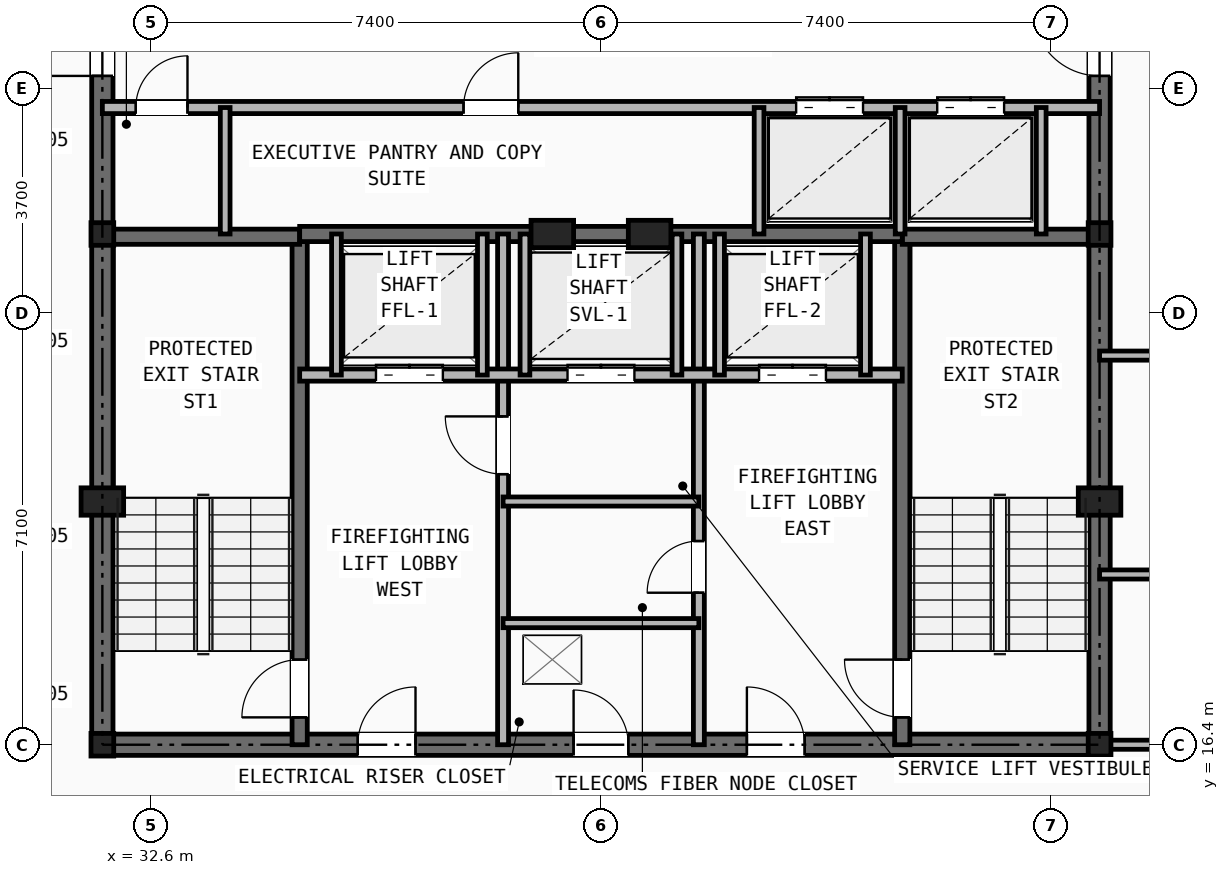
"""IFC4 building model, lengths in metres.
Left out: names, types, materials, properties, quantities, classifications, styles, units other than length and angle.
Written with IfcOpenShell. Run it as: python <this file> out.ifc"""

import sys

from ifc_helpers import new_model, si_unit, direction, frame, frame_2d, origin, origin_2d, place, context, subcontext, project, spatial, rectangle, i_section, extrude, element, fill, save


model = new_model("IFC4")
c1 = context("Model", 3, precision=1e-05, world=origin(), true_north=direction((0.0, 1.0)))
c2 = subcontext(c1, "Body", "Model", "MODEL_VIEW")
j1 = project(units=[si_unit("LENGTHUNIT", "METRE"), si_unit("PLANEANGLEUNIT", "RADIAN")], contexts=[c1])
p1 = place(None, origin())
s1 = spatial("IfcSite", under=j1, at=p1, CompositionType="ELEMENT")
p2 = place(p1, origin())
s2 = spatial("IfcBuilding", under=s1, at=p2, CompositionType="ELEMENT")
p3 = place(p2, frame((0.0, 0.0, 255.0)))
s3 = spatial("IfcBuildingStorey", under=s2, at=p3, CompositionType="ELEMENT", Elevation=255.0)
for number, where, z_axis, x_axis in (
    (1, (31.8, 16.4, 0.0), (0.0, 0.0, 1.0), (1.0, 0.0, 0.0)),
    (2, (48.2, 16.4, 0.0), (0.0, 0.0, 1.0), (1.0, 0.0, 0.0)),
    (3, (31.8, 24.8, 0.0), (0.0, 0.0, 1.0), (1.0, 0.0, 0.0)),
    (4, (48.2, 24.8, 0.0), (0.0, 0.0, 1.0), (1.0, 0.0, 0.0)),
):
    element("IfcColumn", number, at=place(p3, frame(where, z_axis=z_axis, x_axis=x_axis)), inside=s3, PredefinedType="COLUMN", context=c2, shape_type="SweptSolid", body=[
        extrude(i_section(OverallWidth=0.374, OverallDepth=0.372, WebThickness=0.016, FlangeThickness=0.026, at=origin_2d()), origin(), (0.0, 0.0, 1.0), 3.5),
    ])
for number, where, z_axis, x_axis in (
    (5, (31.8, 20.4, 0.0), (0.0, 0.0, 1.0), (1.0, 0.0, 0.0)),
    (6, (48.2, 20.4, 0.0), (0.0, 0.0, 1.0), (1.0, 0.0, 0.0)),
    (7, (39.2, 24.8, 0.0), (0.0, 0.0, 1.0), (1.0, 0.0, 0.0)),
    (8, (40.8, 24.8, 0.0), (0.0, 0.0, 1.0), (1.0, 0.0, 0.0)),
):
    element("IfcColumn", number, at=place(p3, frame(where, z_axis=z_axis, x_axis=x_axis)), inside=s3, PredefinedType="PILASTER", context=c2, shape_type="SweptSolid", body=[
        extrude(rectangle(XDim=0.7, YDim=0.45, at=origin_2d()), origin(), (0.0, 0.0, 1.0), 3.5),
    ])
p4 = place(p3, frame((31.8, 16.4, 0.0), z_axis=(0.0, 0.0, 1.0), x_axis=(1.0, 0.0, 0.0)))
e9 = element("IfcWall", 9, at=p4, inside=s3, PredefinedType="SHEAR", context=c2, shape_type="SweptSolid", body=[
    extrude(rectangle(XDim=16.4, YDim=0.35, at=frame_2d((8.2, 0.0))), origin(), (0.0, 0.0, 1.0), 3.25),
])
p5 = place(p4, frame((7.75, 0.0, 0.0)))
e10 = element("IfcOpeningElement", 10, at=p5, cuts=e9, PredefinedType="OPENING", context=c2, shape_type="SweptSolid", body=[
    extrude(rectangle(XDim=0.9, YDim=2.1, at=frame_2d((0.45, 1.05))), frame((0.0, 0.185, 0.0), z_axis=(0.0, -1.0, 0.0), x_axis=(1.0, 0.0, 0.0)), (0.0, 0.0, 1.0), 0.37),
])
p6 = place(p4, frame((4.2, 0.0, 0.0)))
e11 = element("IfcOpeningElement", 11, at=p6, cuts=e9, PredefinedType="OPENING", context=c2, shape_type="SweptSolid", body=[
    extrude(rectangle(XDim=0.95, YDim=2.1, at=frame_2d((0.475, 1.05))), frame((0.0, 0.185, 0.0), z_axis=(0.0, -1.0, 0.0), x_axis=(1.0, 0.0, 0.0)), (0.0, 0.0, 1.0), 0.37),
])
p7 = place(p4, frame((10.6, 0.0, 0.0)))
e12 = element("IfcOpeningElement", 12, at=p7, cuts=e9, PredefinedType="OPENING", context=c2, shape_type="SweptSolid", body=[
    extrude(rectangle(XDim=0.95, YDim=2.1, at=frame_2d((0.475, 1.05))), frame((0.0, 0.185, 0.0), z_axis=(0.0, -1.0, 0.0), x_axis=(1.0, 0.0, 0.0)), (0.0, 0.0, 1.0), 0.37),
])
p8 = place(p3, frame((31.8, 16.4, 0.0), z_axis=(0.0, 0.0, 1.0), x_axis=(0.0, 1.0, 0.0)))
e13 = element("IfcWall", 13, at=p8, inside=s3, PredefinedType="SHEAR", context=c2, shape_type="SweptSolid", body=[
    extrude(rectangle(XDim=14.8, YDim=0.35, at=frame_2d((7.4, 0.0))), origin(), (0.0, 0.0, 1.0), 3.25),
])
p9 = place(p8, frame((11.0, 0.0, 0.0)))
e14 = element("IfcOpeningElement", 14, at=p9, cuts=e13, PredefinedType="OPENING", context=c2, shape_type="SweptSolid", body=[
    extrude(rectangle(XDim=1.1, YDim=2.15, at=frame_2d((0.55, 1.075))), frame((0.0, 0.185, 0.0), z_axis=(0.0, -1.0, 0.0), x_axis=(1.0, 0.0, 0.0)), (0.0, 0.0, 1.0), 0.37),
])
p10 = place(p3, frame((48.2, 16.4, 0.0), z_axis=(0.0, 0.0, 1.0), x_axis=(0.0, 1.0, 0.0)))
e15 = element("IfcWall", 15, at=p10, inside=s3, PredefinedType="SHEAR", context=c2, shape_type="SweptSolid", body=[
    extrude(rectangle(XDim=14.8, YDim=0.35, at=frame_2d((7.4, 0.0))), origin(), (0.0, 0.0, 1.0), 3.25),
])
p11 = place(p10, frame((11.0, 0.0, 0.0)))
e16 = element("IfcOpeningElement", 16, at=p11, cuts=e15, PredefinedType="OPENING", context=c2, shape_type="SweptSolid", body=[
    extrude(rectangle(XDim=1.1, YDim=2.15, at=frame_2d((0.55, 1.075))), frame((0.0, 0.185, 0.0), z_axis=(0.0, -1.0, 0.0), x_axis=(1.0, 0.0, 0.0)), (0.0, 0.0, 1.0), 0.37),
])
p12 = place(p3, frame((35.045, 16.4, 0.0), z_axis=(0.0, 0.0, 1.0), x_axis=(0.0, 1.0, 0.0)))
e17 = element("IfcWall", 17, at=p12, inside=s3, PredefinedType="SHEAR", context=c2, shape_type="SweptSolid", body=[
    extrude(rectangle(XDim=8.4, YDim=0.25, at=frame_2d((4.2, 0.0))), origin(), (0.0, 0.0, 1.0), 3.25),
])
p13 = place(p12, frame((0.45, 0.0, 0.0)))
e18 = element("IfcOpeningElement", 18, at=p13, cuts=e17, PredefinedType="OPENING", context=c2, shape_type="SweptSolid", body=[
    extrude(rectangle(XDim=0.95, YDim=2.1, at=frame_2d((0.475, 1.05))), frame((0.0, 0.135, 0.0), z_axis=(0.0, -1.0, 0.0), x_axis=(1.0, 0.0, 0.0)), (0.0, 0.0, 1.0), 0.27),
])
p14 = place(p3, frame((31.8, 24.755, 0.0), z_axis=(0.0, 0.0, 1.0), x_axis=(1.0, 0.0, 0.0)))
e19 = element("IfcWall", 19, at=p14, inside=s3, PredefinedType="SHEAR", context=c2, shape_type="SweptSolid", body=[
    extrude(rectangle(XDim=3.245, YDim=0.25, at=frame_2d((1.623, 0.0))), origin(), (0.0, 0.0, 1.0), 3.25),
])
p15 = place(p3, frame((44.955, 16.4, 0.0), z_axis=(0.0, 0.0, 1.0), x_axis=(0.0, 1.0, 0.0)))
e20 = element("IfcWall", 20, at=p15, inside=s3, PredefinedType="SHEAR", context=c2, shape_type="SweptSolid", body=[
    extrude(rectangle(XDim=8.4, YDim=0.25, at=frame_2d((4.2, 0.0))), origin(), (0.0, 0.0, 1.0), 3.25),
])
p16 = place(p15, frame((0.45, 0.0, 0.0)))
e21 = element("IfcOpeningElement", 21, at=p16, cuts=e20, PredefinedType="OPENING", context=c2, shape_type="SweptSolid", body=[
    extrude(rectangle(XDim=0.95, YDim=2.1, at=frame_2d((0.475, 1.05))), frame((0.0, 0.135, 0.0), z_axis=(0.0, -1.0, 0.0), x_axis=(1.0, 0.0, 0.0)), (0.0, 0.0, 1.0), 0.27),
])
p17 = place(p3, frame((44.955, 24.755, 0.0), z_axis=(0.0, 0.0, 1.0), x_axis=(1.0, 0.0, 0.0)))
e22 = element("IfcWall", 22, at=p17, inside=s3, PredefinedType="SHEAR", context=c2, shape_type="SweptSolid", body=[
    extrude(rectangle(XDim=3.245, YDim=0.25, at=frame_2d((1.623, 0.0))), origin(), (0.0, 0.0, 1.0), 3.25),
])
p18 = place(p3, frame((35.045, 24.8, 0.0), z_axis=(0.0, 0.0, 1.0), x_axis=(1.0, 0.0, 0.0)))
e23 = element("IfcWall", 23, at=p18, inside=s3, PredefinedType="SHEAR", context=c2, shape_type="SweptSolid", body=[
    extrude(rectangle(XDim=9.91, YDim=0.25, at=frame_2d((4.955, 0.0))), origin(), (0.0, 0.0, 1.0), 3.25),
])
p19 = place(p3, frame((38.39, 16.4, 0.0), z_axis=(0.0, 0.0, 1.0), x_axis=(0.0, 1.0, 0.0)))
e24 = element("IfcWall", 24, at=p19, inside=s3, PredefinedType="PARTITIONING", context=c2, shape_type="SweptSolid", body=[
    extrude(rectangle(XDim=8.4, YDim=0.18, at=frame_2d((4.2, 0.0))), origin(), (0.0, 0.0, 1.0), 2.705),
])
p20 = place(p19, frame((4.45, 0.0, 0.0)))
e25 = element("IfcOpeningElement", 25, at=p20, cuts=e24, PredefinedType="OPENING", context=c2, shape_type="SweptSolid", body=[
    extrude(rectangle(XDim=0.95, YDim=2.1, at=frame_2d((0.475, 1.05))), frame((0.0, 0.1, 0.0), z_axis=(0.0, -1.0, 0.0), x_axis=(1.0, 0.0, 0.0)), (0.0, 0.0, 1.0), 0.2),
])
p21 = place(p3, frame((41.61, 16.4, 0.0), z_axis=(0.0, 0.0, 1.0), x_axis=(0.0, 1.0, 0.0)))
e26 = element("IfcWall", 26, at=p21, inside=s3, PredefinedType="PARTITIONING", context=c2, shape_type="SweptSolid", body=[
    extrude(rectangle(XDim=8.4, YDim=0.18, at=frame_2d((4.2, 0.0))), origin(), (0.0, 0.0, 1.0), 2.705),
])
p22 = place(p21, frame((2.5, 0.0, 0.0)))
e27 = element("IfcOpeningElement", 27, at=p22, cuts=e26, PredefinedType="OPENING", context=c2, shape_type="SweptSolid", body=[
    extrude(rectangle(XDim=0.85, YDim=2.05, at=frame_2d((0.425, 1.025))), frame((0.0, 0.1, 0.0), z_axis=(0.0, -1.0, 0.0), x_axis=(1.0, 0.0, 0.0)), (0.0, 0.0, 1.0), 0.2),
])
p23 = place(p3, frame((35.045, 22.48, 0.0), z_axis=(0.0, 0.0, 1.0), x_axis=(1.0, 0.0, 0.0)))
e28 = element("IfcWall", 28, at=p23, inside=s3, PredefinedType="SOLIDWALL", context=c2, shape_type="SweptSolid", body=[
    extrude(rectangle(XDim=9.91, YDim=0.2, at=frame_2d((4.955, 0.0))), origin(), (0.0, 0.0, 1.0), 3.25),
])
p24 = place(p23, frame((1.255, 0.0, 0.0)))
e29 = element("IfcOpeningElement", 29, at=p24, cuts=e28, PredefinedType="OPENING", context=c2, shape_type="SweptSolid", body=[
    extrude(rectangle(XDim=1.1, YDim=2.15, at=frame_2d((0.55, 1.075))), frame((0.0, 0.11, 0.0), z_axis=(0.0, -1.0, 0.0), x_axis=(1.0, 0.0, 0.0)), (0.0, 0.0, 1.0), 0.22),
])
p25 = place(p23, frame((7.555, 0.0, 0.0)))
e30 = element("IfcOpeningElement", 30, at=p25, cuts=e28, PredefinedType="OPENING", context=c2, shape_type="SweptSolid", body=[
    extrude(rectangle(XDim=1.1, YDim=2.15, at=frame_2d((0.55, 1.075))), frame((0.0, 0.11, 0.0), z_axis=(0.0, -1.0, 0.0), x_axis=(1.0, 0.0, 0.0)), (0.0, 0.0, 1.0), 0.22),
])
p26 = place(p23, frame((4.405, 0.0, 0.0)))
e31 = element("IfcOpeningElement", 31, at=p26, cuts=e28, PredefinedType="OPENING", context=c2, shape_type="SweptSolid", body=[
    extrude(rectangle(XDim=1.1, YDim=2.15, at=frame_2d((0.55, 1.075))), frame((0.0, 0.11, 0.0), z_axis=(0.0, -1.0, 0.0), x_axis=(1.0, 0.0, 0.0)), (0.0, 0.0, 1.0), 0.22),
])
for number, where, z_axis, x_axis in (
    (32, (38.39, 18.4, 0.0), (0.0, 0.0, 1.0), (1.0, 0.0, 0.0)),
    (33, (38.39, 20.4, 0.0), (0.0, 0.0, 1.0), (1.0, 0.0, 0.0)),
):
    element("IfcWall", number, at=place(p3, frame(where, z_axis=z_axis, x_axis=x_axis)), inside=s3, PredefinedType="PARTITIONING", context=c2, shape_type="SweptSolid", body=[
        extrude(rectangle(XDim=3.22, YDim=0.15, at=frame_2d((1.61, 0.0))), origin(), (0.0, 0.0, 1.0), 3.25),
    ])
for number, where, z_axis, x_axis in (
    (34, (35.65, 22.48, 0.0), (0.0, 0.0, 1.0), (0.0, 1.0, 0.0)),
    (35, (38.05, 22.48, 0.0), (0.0, 0.0, 1.0), (0.0, 1.0, 0.0)),
    (36, (41.95, 22.48, 0.0), (0.0, 0.0, 1.0), (0.0, 1.0, 0.0)),
    (37, (44.35, 22.48, 0.0), (0.0, 0.0, 1.0), (0.0, 1.0, 0.0)),
    (38, (38.75, 22.48, 0.0), (0.0, 0.0, 1.0), (0.0, 1.0, 0.0)),
    (39, (41.25, 22.48, 0.0), (0.0, 0.0, 1.0), (0.0, 1.0, 0.0)),
):
    element("IfcWall", number, at=place(p3, frame(where, z_axis=z_axis, x_axis=x_axis)), inside=s3, PredefinedType="SOLIDWALL", context=c2, shape_type="SweptSolid", body=[
        extrude(rectangle(XDim=2.32, YDim=0.16, at=frame_2d((1.16, 0.0))), origin(), (0.0, 0.0, 1.0), 3.25),
    ])
p27 = place(p3, frame((31.8, 26.88, 0.0), z_axis=(0.0, 0.0, 1.0), x_axis=(1.0, 0.0, 0.0)))
e40 = element("IfcWall", 40, at=p27, inside=s3, PredefinedType="SOLIDWALL", context=c2, shape_type="SweptSolid", body=[
    extrude(rectangle(XDim=16.4, YDim=0.2, at=frame_2d((8.2, 0.0))), origin(), (0.0, 0.0, 1.0), 2.705),
])
p28 = place(p27, frame((0.55, 0.0, 0.0)))
e41 = element("IfcOpeningElement", 41, at=p28, cuts=e40, PredefinedType="OPENING", context=c2, shape_type="SweptSolid", body=[
    extrude(rectangle(XDim=0.85, YDim=2.05, at=frame_2d((0.425, 1.025))), frame((0.0, 0.11, 0.0), z_axis=(0.0, -1.0, 0.0), x_axis=(1.0, 0.0, 0.0)), (0.0, 0.0, 1.0), 0.22),
])
p29 = place(p27, frame((5.94, 0.0, 0.0)))
e42 = element("IfcOpeningElement", 42, at=p29, cuts=e40, PredefinedType="OPENING", context=c2, shape_type="SweptSolid", body=[
    extrude(rectangle(XDim=0.9, YDim=2.1, at=frame_2d((0.45, 1.05))), frame((0.0, 0.11, 0.0), z_axis=(0.0, -1.0, 0.0), x_axis=(1.0, 0.0, 0.0)), (0.0, 0.0, 1.0), 0.22),
])
p30 = place(p27, frame((11.41, 0.0, 0.0)))
e43 = element("IfcOpeningElement", 43, at=p30, cuts=e40, PredefinedType="OPENING", context=c2, shape_type="SweptSolid", body=[
    extrude(rectangle(XDim=1.1, YDim=2.15, at=frame_2d((0.55, 1.075))), frame((0.0, 0.11, 0.0), z_axis=(0.0, -1.0, 0.0), x_axis=(1.0, 0.0, 0.0)), (0.0, 0.0, 1.0), 0.22),
])
p31 = place(p27, frame((13.73, 0.0, 0.0)))
e44 = element("IfcOpeningElement", 44, at=p31, cuts=e40, PredefinedType="OPENING", context=c2, shape_type="SweptSolid", body=[
    extrude(rectangle(XDim=1.1, YDim=2.15, at=frame_2d((0.55, 1.075))), frame((0.0, 0.11, 0.0), z_axis=(0.0, -1.0, 0.0), x_axis=(1.0, 0.0, 0.0)), (0.0, 0.0, 1.0), 0.22),
])
for number, where, z_axis, x_axis in (
    (45, (33.82, 24.8, 0.0), (0.0, 0.0, 1.0), (0.0, 1.0, 0.0)),
    (46, (42.6, 24.8, 0.0), (0.0, 0.0, 1.0), (0.0, 1.0, 0.0)),
    (47, (44.92, 24.8, 0.0), (0.0, 0.0, 1.0), (0.0, 1.0, 0.0)),
    (48, (47.24, 24.8, 0.0), (0.0, 0.0, 1.0), (0.0, 1.0, 0.0)),
):
    element("IfcWall", number, at=place(p3, frame(where, z_axis=z_axis, x_axis=x_axis)), inside=s3, PredefinedType="SOLIDWALL", context=c2, shape_type="SweptSolid", body=[
        extrude(rectangle(XDim=2.08, YDim=0.16, at=frame_2d((1.04, 0.0))), origin(), (0.0, 0.0, 1.0), 3.25),
    ])
p32 = place(p3, frame((48.2, 16.4, 0.0), z_axis=(0.0, 0.0, 1.0), x_axis=(1.0, 0.0, 0.0)))
e49 = element("IfcWall", 49, at=p32, inside=s3, PredefinedType="PARTITIONING", context=c2, shape_type="SweptSolid", body=[
    extrude(rectangle(XDim=15.289, YDim=0.15, at=frame_2d((7.644, 0.0))), origin(), (0.0, 0.0, 1.0), 2.292),
])
p33 = place(p3, frame((48.2, 19.2, 0.0), z_axis=(0.0, 0.0, 1.0), x_axis=(1.0, 0.0, 0.0)))
e50 = element("IfcWall", 50, at=p33, inside=s3, PredefinedType="PARTITIONING", context=c2, shape_type="SweptSolid", body=[
    extrude(rectangle(XDim=13.268, YDim=0.15, at=frame_2d((6.634, 0.0))), origin(), (0.0, 0.0, 1.0), 2.292),
])
p34 = place(p33, frame((1.4, 0.0, 0.0)))
e51 = element("IfcOpeningElement", 51, at=p34, cuts=e50, PredefinedType="OPENING", context=c2, shape_type="SweptSolid", body=[
    extrude(rectangle(XDim=0.95, YDim=2.1, at=frame_2d((0.475, 1.05))), frame((0.0, 0.085, 0.0), z_axis=(0.0, -1.0, 0.0), x_axis=(1.0, 0.0, 0.0)), (0.0, 0.0, 1.0), 0.17),
])
p35 = place(p3, frame((48.2, 22.8, 0.0), z_axis=(0.0, 0.0, 1.0), x_axis=(1.0, 0.0, 0.0)))
e52 = element("IfcWall", 52, at=p35, inside=s3, PredefinedType="PARTITIONING", context=c2, shape_type="SweptSolid", body=[
    extrude(rectangle(XDim=10.67, YDim=0.15, at=frame_2d((5.335, 0.0))), origin(), (0.0, 0.0, 1.0), 2.628),
])
p36 = place(p35, frame((1.4, 0.0, 0.0)))
e53 = element("IfcOpeningElement", 53, at=p36, cuts=e52, PredefinedType="OPENING", context=c2, shape_type="SweptSolid", body=[
    extrude(rectangle(XDim=0.95, YDim=2.1, at=frame_2d((0.475, 1.05))), frame((0.0, 0.085, 0.0), z_axis=(0.0, -1.0, 0.0), x_axis=(1.0, 0.0, 0.0)), (0.0, 0.0, 1.0), 0.17),
])
p37 = place(p5, origin())
e54 = element("IfcDoor", 54, at=p37, inside=s3, OperationType="SINGLE_SWING_LEFT", PredefinedType="DOOR", context=c2, shape_type="SweptSolid", body=[
    extrude(rectangle(XDim=0.9, YDim=2.1, at=frame_2d((0.45, 1.05))), frame((0.0, 0.025, 0.0), z_axis=(0.0, -1.0, 0.0), x_axis=(1.0, 0.0, 0.0)), (0.0, 0.0, 1.0), 0.05),
])
fill(e10, e54)
p38 = place(p22, origin())
e55 = element("IfcDoor", 55, at=p38, inside=s3, OperationType="SINGLE_SWING_LEFT", PredefinedType="DOOR", context=c2, shape_type="SweptSolid", body=[
    extrude(rectangle(XDim=0.85, YDim=2.05, at=frame_2d((0.425, 1.025))), frame((0.0, 0.025, 0.0), z_axis=(0.0, -1.0, 0.0), x_axis=(1.0, 0.0, 0.0)), (0.0, 0.0, 1.0), 0.05),
])
fill(e27, e55)
p39 = place(p20, origin())
e56 = element("IfcDoor", 56, at=p39, inside=s3, OperationType="SINGLE_SWING_RIGHT", PredefinedType="DOOR", context=c2, shape_type="SweptSolid", body=[
    extrude(rectangle(XDim=0.95, YDim=2.1, at=frame_2d((0.475, 1.05))), frame((0.0, 0.025, 0.0), z_axis=(0.0, -1.0, 0.0), x_axis=(1.0, 0.0, 0.0)), (0.0, 0.0, 1.0), 0.05),
])
fill(e25, e56)
p40 = place(p13, origin())
e57 = element("IfcDoor", 57, at=p40, inside=s3, OperationType="SINGLE_SWING_LEFT", PredefinedType="DOOR", context=c2, shape_type="SweptSolid", body=[
    extrude(rectangle(XDim=0.95, YDim=2.1, at=frame_2d((0.475, 1.05))), frame((0.0, 0.025, 0.0), z_axis=(0.0, -1.0, 0.0), x_axis=(1.0, 0.0, 0.0)), (0.0, 0.0, 1.0), 0.05),
])
fill(e18, e57)
p41 = place(p16, origin())
e58 = element("IfcDoor", 58, at=p41, inside=s3, OperationType="SINGLE_SWING_RIGHT", PredefinedType="DOOR", context=c2, shape_type="SweptSolid", body=[
    extrude(rectangle(XDim=0.95, YDim=2.1, at=frame_2d((0.475, 1.05))), frame((0.0, 0.025, 0.0), z_axis=(0.0, -1.0, 0.0), x_axis=(1.0, 0.0, 0.0)), (0.0, 0.0, 1.0), 0.05),
])
fill(e21, e58)
p42 = place(p6, origin())
e59 = element("IfcDoor", 59, at=p42, inside=s3, OperationType="SINGLE_SWING_RIGHT", PredefinedType="DOOR", context=c2, shape_type="SweptSolid", body=[
    extrude(rectangle(XDim=0.95, YDim=2.1, at=frame_2d((0.475, 1.05))), frame((0.0, 0.025, 0.0), z_axis=(0.0, -1.0, 0.0), x_axis=(1.0, 0.0, 0.0)), (0.0, 0.0, 1.0), 0.05),
])
fill(e11, e59)
p43 = place(p7, origin())
e60 = element("IfcDoor", 60, at=p43, inside=s3, OperationType="SINGLE_SWING_LEFT", PredefinedType="DOOR", context=c2, shape_type="SweptSolid", body=[
    extrude(rectangle(XDim=0.95, YDim=2.1, at=frame_2d((0.475, 1.05))), frame((0.0, 0.025, 0.0), z_axis=(0.0, -1.0, 0.0), x_axis=(1.0, 0.0, 0.0)), (0.0, 0.0, 1.0), 0.05),
])
fill(e12, e60)
p44 = place(p24, origin())
e61 = element("IfcDoor", 61, at=p44, inside=s3, OperationType="DOUBLE_DOOR_SLIDING", PredefinedType="DOOR", context=c2, shape_type="SweptSolid", body=[
    extrude(rectangle(XDim=1.1, YDim=2.15, at=frame_2d((0.55, 1.075))), frame((0.0, 0.025, 0.0), z_axis=(0.0, -1.0, 0.0), x_axis=(1.0, 0.0, 0.0)), (0.0, 0.0, 1.0), 0.05),
])
fill(e29, e61)
p45 = place(p25, origin())
e62 = element("IfcDoor", 62, at=p45, inside=s3, OperationType="DOUBLE_DOOR_SLIDING", PredefinedType="DOOR", context=c2, shape_type="SweptSolid", body=[
    extrude(rectangle(XDim=1.1, YDim=2.15, at=frame_2d((0.55, 1.075))), frame((0.0, 0.025, 0.0), z_axis=(0.0, -1.0, 0.0), x_axis=(1.0, 0.0, 0.0)), (0.0, 0.0, 1.0), 0.05),
])
fill(e30, e62)
p46 = place(p26, origin())
e63 = element("IfcDoor", 63, at=p46, inside=s3, OperationType="DOUBLE_DOOR_SLIDING", PredefinedType="DOOR", context=c2, shape_type="SweptSolid", body=[
    extrude(rectangle(XDim=1.1, YDim=2.15, at=frame_2d((0.55, 1.075))), frame((0.0, 0.025, 0.0), z_axis=(0.0, -1.0, 0.0), x_axis=(1.0, 0.0, 0.0)), (0.0, 0.0, 1.0), 0.05),
])
fill(e31, e63)
p47 = place(p28, origin())
e64 = element("IfcDoor", 64, at=p47, inside=s3, OperationType="SINGLE_SWING_RIGHT", PredefinedType="DOOR", context=c2, shape_type="SweptSolid", body=[
    extrude(rectangle(XDim=0.85, YDim=2.05, at=frame_2d((0.425, 1.025))), frame((0.0, 0.025, 0.0), z_axis=(0.0, -1.0, 0.0), x_axis=(1.0, 0.0, 0.0)), (0.0, 0.0, 1.0), 0.05),
])
fill(e41, e64)
p48 = place(p9, origin())
e65 = element("IfcDoor", 65, at=p48, inside=s3, OperationType="SINGLE_SWING_LEFT", PredefinedType="DOOR", context=c2, shape_type="SweptSolid", body=[
    extrude(rectangle(XDim=1.1, YDim=2.15, at=frame_2d((0.55, 1.075))), frame((0.0, 0.025, 0.0), z_axis=(0.0, -1.0, 0.0), x_axis=(1.0, 0.0, 0.0)), (0.0, 0.0, 1.0), 0.05),
])
fill(e14, e65)
p49 = place(p11, origin())
e66 = element("IfcDoor", 66, at=p49, inside=s3, OperationType="SINGLE_SWING_RIGHT", PredefinedType="DOOR", context=c2, shape_type="SweptSolid", body=[
    extrude(rectangle(XDim=1.1, YDim=2.15, at=frame_2d((0.55, 1.075))), frame((0.0, 0.025, 0.0), z_axis=(0.0, -1.0, 0.0), x_axis=(1.0, 0.0, 0.0)), (0.0, 0.0, 1.0), 0.05),
])
fill(e16, e66)
p50 = place(p29, origin())
e67 = element("IfcDoor", 67, at=p50, inside=s3, OperationType="SINGLE_SWING_RIGHT", PredefinedType="DOOR", context=c2, shape_type="SweptSolid", body=[
    extrude(rectangle(XDim=0.9, YDim=2.1, at=frame_2d((0.45, 1.05))), frame((0.0, 0.025, 0.0), z_axis=(0.0, -1.0, 0.0), x_axis=(1.0, 0.0, 0.0)), (0.0, 0.0, 1.0), 0.05),
])
fill(e42, e67)
p51 = place(p30, origin())
e68 = element("IfcDoor", 68, at=p51, inside=s3, OperationType="DOUBLE_DOOR_SLIDING", PredefinedType="DOOR", context=c2, shape_type="SweptSolid", body=[
    extrude(rectangle(XDim=1.1, YDim=2.15, at=frame_2d((0.55, 1.075))), frame((0.0, 0.025, 0.0), z_axis=(0.0, -1.0, 0.0), x_axis=(1.0, 0.0, 0.0)), (0.0, 0.0, 1.0), 0.05),
])
fill(e43, e68)
p52 = place(p31, origin())
e69 = element("IfcDoor", 69, at=p52, inside=s3, OperationType="DOUBLE_DOOR_SLIDING", PredefinedType="DOOR", context=c2, shape_type="SweptSolid", body=[
    extrude(rectangle(XDim=1.1, YDim=2.15, at=frame_2d((0.55, 1.075))), frame((0.0, 0.025, 0.0), z_axis=(0.0, -1.0, 0.0), x_axis=(1.0, 0.0, 0.0)), (0.0, 0.0, 1.0), 0.05),
])
fill(e44, e69)
save(model, sys.argv[1])
